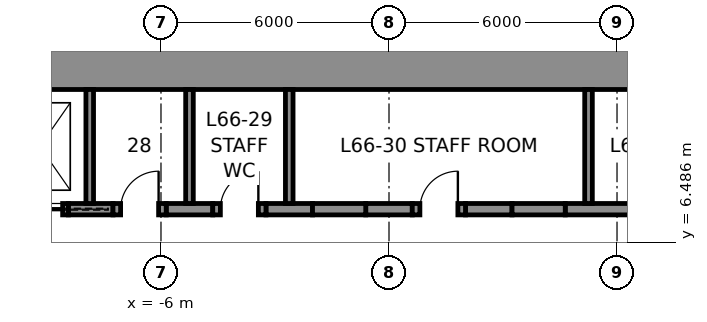
"""IFC4 building model, lengths in metres.
Left out: names, types, materials, properties, quantities, classifications, styles, units other than length and angle.
Written with IfcOpenShell. Run it as: python <this file> out.ifc"""

import sys

from ifc_helpers import new_model, si_unit, direction, frame, frame_2d, origin, place, context, subcontext, project, spatial, rectangle, extrude, element, fill, save


model = new_model("IFC4")
c1 = context("Model", 3, precision=1e-05, world=origin(), true_north=direction((0.0, 1.0)))
c2 = subcontext(c1, "Body", "Model", "MODEL_VIEW")
j1 = project(units=[si_unit("LENGTHUNIT", "METRE"), si_unit("PLANEANGLEUNIT", "RADIAN")], contexts=[c1])
p1 = place(None, origin())
s1 = spatial("IfcSite", under=j1, at=p1, CompositionType="ELEMENT")
p2 = place(p1, origin())
s2 = spatial("IfcBuilding", under=s1, at=p2, CompositionType="ELEMENT")
p3 = place(p2, frame((0.0, 0.0, 293.8)))
s3 = spatial("IfcBuildingStorey", under=s2, at=p3, CompositionType="ELEMENT", Elevation=293.8)
p4 = place(p3, frame((-12.0, 11.25, 0.0), z_axis=(0.0, 0.0, 1.0), x_axis=(1.0, 0.0, 0.0)))
e1 = element("IfcWall", 1, at=p4, inside=s3, PredefinedType="SHEAR", context=c2, shape_type="SweptSolid", body=[
    extrude(rectangle(XDim=24.0, YDim=1.5, at=frame_2d((12.0, 0.0))), origin(), (0.0, 0.0, 1.0), 4.0),
])
p5 = place(p3, frame((-8.438, 7.35, 0.0), z_axis=(0.0, 0.0, 1.0), x_axis=(1.0, 0.0, 0.0)))
e2 = element("IfcWall", 2, at=p5, inside=s3, PredefinedType="SHEAR", context=c2, shape_type="SweptSolid", body=[
    extrude(rectangle(XDim=1.175, YDim=0.3, at=frame_2d((0.587, 0.0))), origin(), (0.0, 0.0, 1.0), 4.0),
])
for number, where, z_axis, x_axis in (
    (3, (-5.863, 7.35, 0.0), (0.0, 0.0, 1.0), (1.0, 0.0, 0.0)),
    (4, (-3.238, 7.35, 0.0), (0.0, 0.0, 1.0), (1.0, 0.0, 0.0)),
    (5, (-0.613, 7.35, 0.0), (0.0, 0.0, 1.0), (1.0, 0.0, 0.0)),
    (6, (2.012, 7.35, 0.0), (0.0, 0.0, 1.0), (1.0, 0.0, 0.0)),
):
    element("IfcWall", number, at=place(p3, frame(where, z_axis=z_axis, x_axis=x_axis)), inside=s3, PredefinedType="SHEAR", context=c2, shape_type="SweptSolid", body=[
        extrude(rectangle(XDim=1.225, YDim=0.3, at=frame_2d((0.613, 0.0))), origin(), (0.0, 0.0, 1.0), 4.0),
    ])
p6 = place(p3, frame((4.637, 7.35, 0.0), z_axis=(0.0, 0.0, 1.0), x_axis=(1.0, 0.0, 0.0)))
e7 = element("IfcWall", 7, at=p6, inside=s3, PredefinedType="SHEAR", context=c2, shape_type="SweptSolid", body=[
    extrude(rectangle(XDim=1.887, YDim=0.3, at=frame_2d((0.944, 0.0))), origin(), (0.0, 0.0, 1.0), 4.0),
])
p7 = place(p3, frame((-9.938, 7.35, 0.0), z_axis=(0.0, 0.0, 1.0), x_axis=(1.0, 0.0, 0.0)))
e8 = element("IfcWall", 8, at=p7, inside=s3, PredefinedType="PARTITIONING", context=c2, shape_type="SweptSolid", body=[
    extrude(rectangle(XDim=1.5, YDim=0.3, at=frame_2d((0.75, 0.0))), origin(), (0.0, 0.0, 1.0), 4.0),
])
p8 = place(p7, frame((0.15, 0.0, 0.0)))
e9 = element("IfcOpeningElement", 9, at=p8, cuts=e8, PredefinedType="OPENING", context=c2, shape_type="SweptSolid", body=[
    extrude(rectangle(XDim=1.2, YDim=2.3, at=frame_2d((0.6, 1.15))), frame((0.0, 0.16, 0.0), z_axis=(0.0, -1.0, 0.0), x_axis=(1.0, 0.0, 0.0)), (0.0, 0.0, 1.0), 0.32),
])
p9 = place(p3, frame((-7.262, 7.35, 0.0), z_axis=(0.0, 0.0, 1.0), x_axis=(1.0, 0.0, 0.0)))
e10 = element("IfcWall", 10, at=p9, inside=s3, PredefinedType="PARTITIONING", context=c2, shape_type="SweptSolid", body=[
    extrude(rectangle(XDim=1.4, YDim=0.3, at=frame_2d((0.7, 0.0))), origin(), (0.0, 0.0, 1.0), 4.0),
])
p10 = place(p9, frame((0.2, 0.0, 0.0)))
e11 = element("IfcOpeningElement", 11, at=p10, cuts=e10, PredefinedType="OPENING", context=c2, shape_type="SweptSolid", body=[
    extrude(rectangle(XDim=1.0, YDim=2.3, at=frame_2d((0.5, 1.15))), frame((0.0, 0.16, 0.0), z_axis=(0.0, -1.0, 0.0), x_axis=(1.0, 0.0, 0.0)), (0.0, 0.0, 1.0), 0.32),
])
p11 = place(p3, frame((-4.637, 7.35, 0.0), z_axis=(0.0, 0.0, 1.0), x_axis=(1.0, 0.0, 0.0)))
e12 = element("IfcWall", 12, at=p11, inside=s3, PredefinedType="PARTITIONING", context=c2, shape_type="SweptSolid", body=[
    extrude(rectangle(XDim=1.4, YDim=0.3, at=frame_2d((0.7, 0.0))), origin(), (0.0, 0.0, 1.0), 4.0),
])
p12 = place(p11, frame((0.2, 0.0, 0.0)))
e13 = element("IfcOpeningElement", 13, at=p12, cuts=e12, PredefinedType="OPENING", context=c2, shape_type="SweptSolid", body=[
    extrude(rectangle(XDim=1.0, YDim=2.3, at=frame_2d((0.5, 1.15))), frame((0.0, 0.16, 0.0), z_axis=(0.0, -1.0, 0.0), x_axis=(1.0, 0.0, 0.0)), (0.0, 0.0, 1.0), 0.32),
])
p13 = place(p3, frame((-2.012, 7.35, 0.0), z_axis=(0.0, 0.0, 1.0), x_axis=(1.0, 0.0, 0.0)))
e14 = element("IfcWall", 14, at=p13, inside=s3, PredefinedType="PARTITIONING", context=c2, shape_type="SweptSolid", body=[
    extrude(rectangle(XDim=1.4, YDim=0.3, at=frame_2d((0.7, 0.0))), origin(), (0.0, 0.0, 1.0), 4.0),
])
p14 = place(p3, frame((0.613, 7.35, 0.0), z_axis=(0.0, 0.0, 1.0), x_axis=(1.0, 0.0, 0.0)))
e15 = element("IfcWall", 15, at=p14, inside=s3, PredefinedType="PARTITIONING", context=c2, shape_type="SweptSolid", body=[
    extrude(rectangle(XDim=1.4, YDim=0.3, at=frame_2d((0.7, 0.0))), origin(), (0.0, 0.0, 1.0), 4.0),
])
p15 = place(p14, frame((0.2, 0.0, 0.0)))
e16 = element("IfcOpeningElement", 16, at=p15, cuts=e15, PredefinedType="OPENING", context=c2, shape_type="SweptSolid", body=[
    extrude(rectangle(XDim=1.0, YDim=2.3, at=frame_2d((0.5, 1.15))), frame((0.0, 0.16, 0.0), z_axis=(0.0, -1.0, 0.0), x_axis=(1.0, 0.0, 0.0)), (0.0, 0.0, 1.0), 0.32),
])
p16 = place(p3, frame((3.238, 7.35, 0.0), z_axis=(0.0, 0.0, 1.0), x_axis=(1.0, 0.0, 0.0)))
e17 = element("IfcWall", 17, at=p16, inside=s3, PredefinedType="PARTITIONING", context=c2, shape_type="SweptSolid", body=[
    extrude(rectangle(XDim=1.4, YDim=0.3, at=frame_2d((0.7, 0.0))), origin(), (0.0, 0.0, 1.0), 4.0),
])
for number, where, z_axis, x_axis in (
    (18, (-7.875, 7.5, 0.0), (0.0, 0.0, 1.0), (0.0, 1.0, 0.0)),
    (19, (-5.25, 7.5, 0.0), (0.0, 0.0, 1.0), (0.0, 1.0, 0.0)),
    (20, (-2.625, 7.5, 0.0), (0.0, 0.0, 1.0), (0.0, 1.0, 0.0)),
    (21, (5.25, 7.5, 0.0), (0.0, 0.0, 1.0), (0.0, 1.0, 0.0)),
):
    element("IfcWall", number, at=place(p3, frame(where, z_axis=z_axis, x_axis=x_axis)), inside=s3, PredefinedType="PARTITIONING", context=c2, shape_type="SweptSolid", body=[
        extrude(rectangle(XDim=3.0, YDim=0.2, at=frame_2d((1.5, 0.0))), origin(), (0.0, 0.0, 1.0), 4.0),
    ])
p17 = place(p10, origin())
e22 = element("IfcDoor", 22, at=p17, inside=s3, OperationType="SINGLE_SWING_RIGHT", PredefinedType="DOOR", context=c2, shape_type="SweptSolid", body=[
    extrude(rectangle(XDim=1.0, YDim=2.3, at=frame_2d((0.5, 1.15))), frame((0.0, 0.025, 0.0), z_axis=(0.0, -1.0, 0.0), x_axis=(1.0, 0.0, 0.0)), (0.0, 0.0, 1.0), 0.05),
])
fill(e11, e22)
p18 = place(p12, origin())
e23 = element("IfcDoor", 23, at=p18, inside=s3, OperationType="SINGLE_SWING_RIGHT", PredefinedType="DOOR", context=c2, shape_type="SweptSolid", body=[
    extrude(rectangle(XDim=1.0, YDim=2.3, at=frame_2d((0.5, 1.15))), frame((0.0, 0.025, 0.0), z_axis=(0.0, -1.0, 0.0), x_axis=(1.0, 0.0, 0.0)), (0.0, 0.0, 1.0), 0.05),
])
fill(e13, e23)
p19 = place(p15, origin())
e24 = element("IfcDoor", 24, at=p19, inside=s3, OperationType="SINGLE_SWING_RIGHT", PredefinedType="DOOR", context=c2, shape_type="SweptSolid", body=[
    extrude(rectangle(XDim=1.0, YDim=2.3, at=frame_2d((0.5, 1.15))), frame((0.0, 0.025, 0.0), z_axis=(0.0, -1.0, 0.0), x_axis=(1.0, 0.0, 0.0)), (0.0, 0.0, 1.0), 0.05),
])
fill(e16, e24)
p20 = place(p8, frame((1.2, 0.0, 0.0), z_axis=(0.0, 0.0, 1.0), x_axis=(-1.0, 0.0, 0.0)))
e25 = element("IfcDoor", 25, at=p20, inside=s3, OperationType="SLIDING_TO_LEFT", PredefinedType="DOOR", context=c2, shape_type="SweptSolid", body=[
    extrude(rectangle(XDim=1.2, YDim=2.3, at=frame_2d((0.6, 1.15))), frame((0.0, 0.025, 0.0), z_axis=(0.0, -1.0, 0.0), x_axis=(1.0, 0.0, 0.0)), (0.0, 0.0, 1.0), 0.05),
])
fill(e9, e25)
save(model, sys.argv[1])
